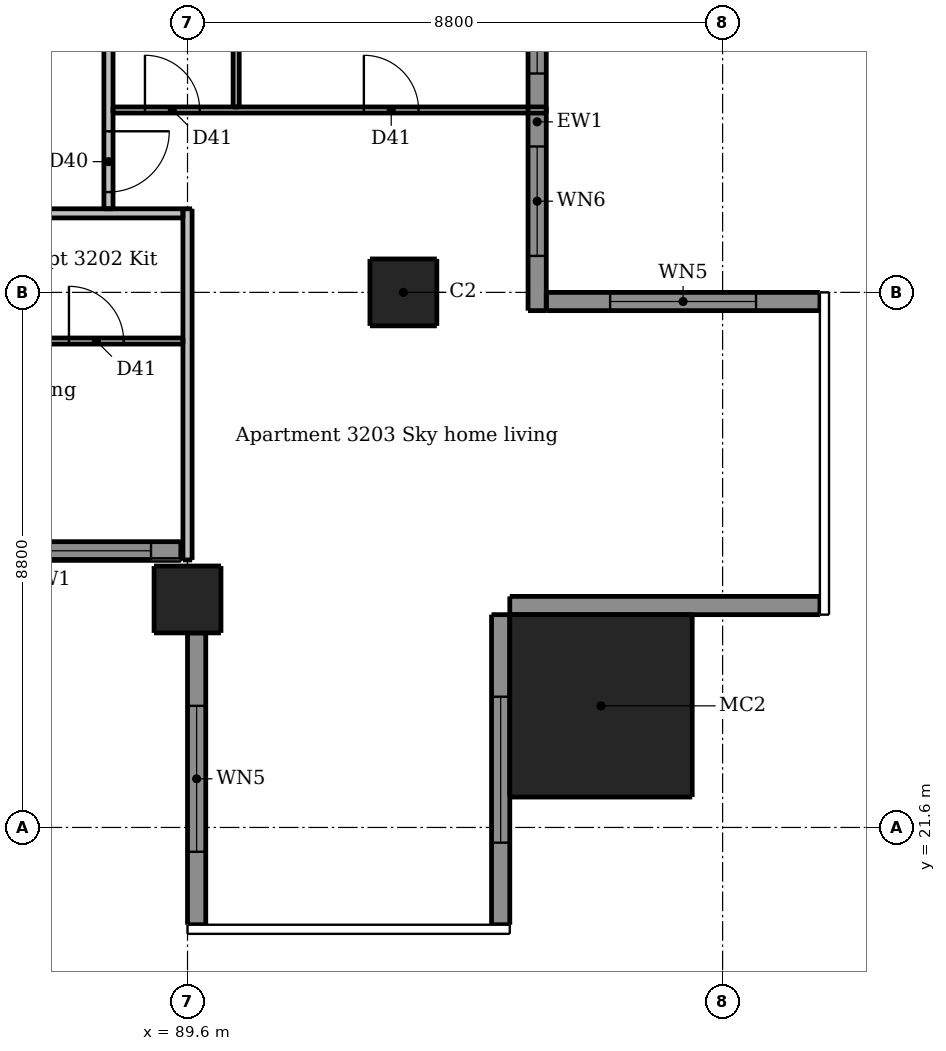
"""IFC4 building model, lengths in metres.
Left out: names, types, materials, properties, quantities, classifications, styles, units other than length and angle.
Written with IfcOpenShell. Run it as: python <this file> out.ifc"""

import sys

from ifc_helpers import new_model, si_unit, direction, frame, frame_2d, origin, origin_2d, place, context, subcontext, project, spatial, rectangle, extrude, element, fill, save


model = new_model("IFC4")
c1 = context("Model", 3, precision=1e-05, world=origin(), true_north=direction((0.0, 1.0)))
c2 = subcontext(c1, "Body", "Model", "MODEL_VIEW")
j1 = project(units=[si_unit("LENGTHUNIT", "METRE"), si_unit("PLANEANGLEUNIT", "RADIAN")], contexts=[c1])
p1 = place(None, origin())
s1 = spatial("IfcSite", under=j1, at=p1, CompositionType="ELEMENT")
p2 = place(p1, origin())
s2 = spatial("IfcBuilding", under=s1, at=p2, CompositionType="ELEMENT")
p3 = place(p2, frame((0.0, 0.0, 118.3)))
s3 = spatial("IfcBuildingStorey", under=s2, at=p3, CompositionType="ELEMENT", Elevation=118.3)
for number, where, z_axis, x_axis in (
    (1, (89.6, 25.35, 0.0), (0.0, 0.0, 1.0), (1.0, 0.0, 0.0)),
    (2, (93.15, 30.4, 0.0), (0.0, 0.0, 1.0), (1.0, 0.0, 0.0)),
):
    element("IfcColumn", number, at=place(p3, frame(where, z_axis=z_axis, x_axis=x_axis)), inside=s3, PredefinedType="COLUMN", context=c2, shape_type="SweptSolid", body=[
        extrude(rectangle(XDim=1.1, YDim=1.1, at=origin_2d()), origin(), (0.0, 0.0, 1.0), 3.05),
    ])
p4 = place(p3, frame((96.4, 23.6, 0.0), z_axis=(0.0, 0.0, 1.0), x_axis=(1.0, 0.0, 0.0)))
e3 = element("IfcColumn", 3, at=p4, inside=s3, PredefinedType="COLUMN", context=c2, shape_type="SweptSolid", body=[
    extrude(rectangle(XDim=3.0, YDim=3.0, at=origin_2d()), origin(), (0.0, 0.0, 1.0), 3.3),
])
p5 = place(p3, frame((89.75, 24.8, 0.0), z_axis=(0.0, 0.0, 1.0), x_axis=(0.0, -1.0, 0.0)))
e4 = element("IfcWall", 4, at=p5, inside=s3, PredefinedType="SOLIDWALL", context=c2, shape_type="SweptSolid", body=[
    extrude(rectangle(XDim=4.8, YDim=0.3, at=frame_2d((2.4, 0.0))), origin(), (0.0, 0.0, 1.0), 3.05),
])
p6 = place(p5, frame((1.2, 0.0, 0.15)))
e5 = element("IfcOpeningElement", 5, at=p6, cuts=e4, PredefinedType="OPENING", context=c2, shape_type="SweptSolid", body=[
    extrude(rectangle(XDim=2.4, YDim=2.1, at=frame_2d((1.2, 1.05))), frame((0.0, 0.16, 0.0), z_axis=(0.0, -1.0, 0.0), x_axis=(1.0, 0.0, 0.0)), (0.0, 0.0, 1.0), 0.32),
])
p7 = place(p3, frame((94.75, 20.0, 0.0), z_axis=(0.0, 0.0, 1.0), x_axis=(0.0, 1.0, 0.0)))
e6 = element("IfcWall", 6, at=p7, inside=s3, PredefinedType="SOLIDWALL", context=c2, shape_type="SweptSolid", body=[
    extrude(rectangle(XDim=5.1, YDim=0.3, at=frame_2d((2.55, 0.0))), origin(), (0.0, 0.0, 1.0), 3.05),
])
p8 = place(p7, frame((1.35, 0.0, 0.15)))
e7 = element("IfcOpeningElement", 7, at=p8, cuts=e6, PredefinedType="OPENING", context=c2, shape_type="SweptSolid", body=[
    extrude(rectangle(XDim=2.4, YDim=2.1, at=frame_2d((1.2, 1.05))), frame((0.0, 0.16, 0.0), z_axis=(0.0, -1.0, 0.0), x_axis=(1.0, 0.0, 0.0)), (0.0, 0.0, 1.0), 0.32),
])
p9 = place(p3, frame((94.9, 25.25, 0.0), z_axis=(0.0, 0.0, 1.0), x_axis=(1.0, 0.0, 0.0)))
e8 = element("IfcWall", 8, at=p9, inside=s3, PredefinedType="SOLIDWALL", context=c2, shape_type="SweptSolid", body=[
    extrude(rectangle(XDim=5.1, YDim=0.3, at=frame_2d((2.55, 0.0))), origin(), (0.0, 0.0, 1.0), 3.05),
])
p10 = place(p3, frame((100.0, 30.25, 0.0), z_axis=(0.0, 0.0, 1.0), x_axis=(-1.0, 0.0, 0.0)))
e9 = element("IfcWall", 9, at=p10, inside=s3, PredefinedType="SOLIDWALL", context=c2, shape_type="SweptSolid", body=[
    extrude(rectangle(XDim=4.5, YDim=0.3, at=frame_2d((2.25, 0.0))), origin(), (0.0, 0.0, 1.0), 3.05),
])
p11 = place(p10, frame((1.05, 0.0, 0.15)))
e10 = element("IfcOpeningElement", 10, at=p11, cuts=e9, PredefinedType="OPENING", context=c2, shape_type="SweptSolid", body=[
    extrude(rectangle(XDim=2.4, YDim=2.1, at=frame_2d((1.2, 1.05))), frame((0.0, 0.16, 0.0), z_axis=(0.0, -1.0, 0.0), x_axis=(1.0, 0.0, 0.0)), (0.0, 0.0, 1.0), 0.32),
])
p12 = place(p3, frame((83.7, 26.15, 0.0), z_axis=(0.0, 0.0, 1.0), x_axis=(1.0, 0.0, 0.0)))
e11 = element("IfcWall", 11, at=p12, inside=s3, PredefinedType="SOLIDWALL", context=c2, shape_type="SweptSolid", body=[
    extrude(rectangle(XDim=5.79, YDim=0.3, at=frame_2d((2.895, 0.0))), origin(), (0.0, 0.0, 1.0), 3.05),
])
p13 = place(p12, frame((0.5, 0.0, 0.15)))
e12 = element("IfcOpeningElement", 12, at=p13, cuts=e11, PredefinedType="OPENING", context=c2, shape_type="SweptSolid", body=[
    extrude(rectangle(XDim=1.8, YDim=2.1, at=frame_2d((0.9, 1.05))), frame((0.0, 0.16, 0.0), z_axis=(0.0, -1.0, 0.0), x_axis=(1.0, 0.0, 0.0)), (0.0, 0.0, 1.0), 0.32),
])
p14 = place(p12, frame((3.5, 0.0, 0.15)))
e13 = element("IfcOpeningElement", 13, at=p14, cuts=e11, PredefinedType="OPENING", context=c2, shape_type="SweptSolid", body=[
    extrude(rectangle(XDim=1.8, YDim=2.1, at=frame_2d((0.9, 1.05))), frame((0.0, 0.16, 0.0), z_axis=(0.0, -1.0, 0.0), x_axis=(1.0, 0.0, 0.0)), (0.0, 0.0, 1.0), 0.32),
])
p15 = place(p3, frame((95.35, 30.1, 0.0), z_axis=(0.0, 0.0, 1.0), x_axis=(0.0, 1.0, 0.0)))
e14 = element("IfcWall", 14, at=p15, inside=s3, PredefinedType="SOLIDWALL", context=c2, shape_type="SweptSolid", body=[
    extrude(rectangle(XDim=6.21, YDim=0.3, at=frame_2d((3.105, 0.0))), origin(), (0.0, 0.0, 1.0), 3.05),
])
p16 = place(p15, frame((0.9, 0.0, 0.15)))
e15 = element("IfcOpeningElement", 15, at=p16, cuts=e14, PredefinedType="OPENING", context=c2, shape_type="SweptSolid", body=[
    extrude(rectangle(XDim=1.8, YDim=2.1, at=frame_2d((0.9, 1.05))), frame((0.0, 0.16, 0.0), z_axis=(0.0, -1.0, 0.0), x_axis=(1.0, 0.0, 0.0)), (0.0, 0.0, 1.0), 0.32),
])
p17 = place(p15, frame((3.9, 0.0, 0.15)))
e16 = element("IfcOpeningElement", 16, at=p17, cuts=e14, PredefinedType="OPENING", context=c2, shape_type="SweptSolid", body=[
    extrude(rectangle(XDim=1.8, YDim=2.1, at=frame_2d((0.9, 1.05))), frame((0.0, 0.16, 0.0), z_axis=(0.0, -1.0, 0.0), x_axis=(1.0, 0.0, 0.0)), (0.0, 0.0, 1.0), 0.32),
])
p18 = place(p3, frame((90.4, 33.45, 0.0), z_axis=(0.0, 0.0, 1.0), x_axis=(0.0, 1.0, 0.0)))
e17 = element("IfcWall", 17, at=p18, inside=s3, PredefinedType="PARTITIONING", context=c2, shape_type="SweptSolid", body=[
    extrude(rectangle(XDim=5.875, YDim=0.1, at=frame_2d((2.938, 0.0))), origin(), (0.0, 0.0, 1.0), 3.05),
])
p19 = place(p18, frame((3.75, 0.0, 0.0)))
e18 = element("IfcOpeningElement", 18, at=p19, cuts=e17, PredefinedType="OPENING", context=c2, shape_type="SweptSolid", body=[
    extrude(rectangle(XDim=0.8, YDim=2.1, at=frame_2d((0.4, 1.05))), frame((0.0, 0.06, 0.0), z_axis=(0.0, -1.0, 0.0), x_axis=(1.0, 0.0, 0.0)), (0.0, 0.0, 1.0), 0.12),
])
p20 = place(p3, frame((88.375, 33.4, 0.0), z_axis=(0.0, 0.0, 1.0), x_axis=(1.0, 0.0, 0.0)))
e19 = element("IfcWall", 19, at=p20, inside=s3, PredefinedType="PARTITIONING", context=c2, shape_type="SweptSolid", body=[
    extrude(rectangle(XDim=7.125, YDim=0.1, at=frame_2d((3.562, 0.0))), origin(), (0.0, 0.0, 1.0), 3.05),
])
p21 = place(p20, frame((0.525, 0.0, 0.0)))
e20 = element("IfcOpeningElement", 20, at=p21, cuts=e19, PredefinedType="OPENING", context=c2, shape_type="SweptSolid", body=[
    extrude(rectangle(XDim=0.9, YDim=2.1, at=frame_2d((0.45, 1.05))), frame((0.0, 0.06, 0.0), z_axis=(0.0, -1.0, 0.0), x_axis=(1.0, 0.0, 0.0)), (0.0, 0.0, 1.0), 0.12),
])
p22 = place(p20, frame((4.125, 0.0, 0.0)))
e21 = element("IfcOpeningElement", 21, at=p22, cuts=e19, PredefinedType="OPENING", context=c2, shape_type="SweptSolid", body=[
    extrude(rectangle(XDim=0.9, YDim=2.1, at=frame_2d((0.45, 1.05))), frame((0.0, 0.06, 0.0), z_axis=(0.0, -1.0, 0.0), x_axis=(1.0, 0.0, 0.0)), (0.0, 0.0, 1.0), 0.12),
])
p23 = place(p3, frame((86.65, 29.6, 0.0), z_axis=(0.0, 0.0, 1.0), x_axis=(1.0, 0.0, 0.0)))
e22 = element("IfcWall", 22, at=p23, inside=s3, PredefinedType="PARTITIONING", context=c2, shape_type="SweptSolid", body=[
    extrude(rectangle(XDim=2.875, YDim=0.1, at=frame_2d((1.438, 0.0))), origin(), (0.0, 0.0, 1.0), 3.05),
])
p24 = place(p23, frame((1.0, 0.0, 0.0)))
e23 = element("IfcOpeningElement", 23, at=p24, cuts=e22, PredefinedType="OPENING", context=c2, shape_type="SweptSolid", body=[
    extrude(rectangle(XDim=0.9, YDim=2.1, at=frame_2d((0.45, 1.05))), frame((0.0, 0.06, 0.0), z_axis=(0.0, -1.0, 0.0), x_axis=(1.0, 0.0, 0.0)), (0.0, 0.0, 1.0), 0.12),
])
p25 = place(p3, frame((88.3, 60.475, 0.0), z_axis=(0.0, 0.0, 1.0), x_axis=(0.0, -1.0, 0.0)))
e24 = element("IfcWall", 24, at=p25, inside=s3, PredefinedType="PARTITIONING", context=c2, shape_type="SweptSolid", body=[
    extrude(rectangle(XDim=28.7, YDim=0.15, at=frame_2d((14.35, 0.0))), origin(), (0.0, 0.0, 1.0), 3.05),
])
p26 = place(p25, frame((27.425, 0.0, 0.0)))
e25 = element("IfcOpeningElement", 25, at=p26, cuts=e24, PredefinedType="OPENING", context=c2, shape_type="SweptSolid", body=[
    extrude(rectangle(XDim=1.0, YDim=2.1, at=frame_2d((0.5, 1.05))), frame((0.0, 0.085, 0.0), z_axis=(0.0, -1.0, 0.0), x_axis=(1.0, 0.0, 0.0)), (0.0, 0.0, 1.0), 0.17),
])
p27 = place(p25, frame((13.075, 0.0, 0.0)))
e26 = element("IfcOpeningElement", 26, at=p27, cuts=e24, PredefinedType="OPENING", context=c2, shape_type="SweptSolid", body=[
    extrude(rectangle(XDim=1.0, YDim=2.1, at=frame_2d((0.5, 1.05))), frame((0.0, 0.085, 0.0), z_axis=(0.0, -1.0, 0.0), x_axis=(1.0, 0.0, 0.0)), (0.0, 0.0, 1.0), 0.17),
])
p28 = place(p25, frame((2.575, 0.0, 0.0)))
e27 = element("IfcOpeningElement", 27, at=p28, cuts=e24, PredefinedType="OPENING", context=c2, shape_type="SweptSolid", body=[
    extrude(rectangle(XDim=1.0, YDim=2.1, at=frame_2d((0.5, 1.05))), frame((0.0, 0.085, 0.0), z_axis=(0.0, -1.0, 0.0), x_axis=(1.0, 0.0, 0.0)), (0.0, 0.0, 1.0), 0.17),
])
p29 = place(p3, frame((89.6, 26.0, 0.0), z_axis=(0.0, 0.0, 1.0), x_axis=(0.0, 1.0, 0.0)))
e28 = element("IfcWall", 28, at=p29, inside=s3, PredefinedType="PARTITIONING", context=c2, shape_type="SweptSolid", body=[
    extrude(rectangle(XDim=5.775, YDim=0.15, at=frame_2d((2.887, 0.0))), origin(), (0.0, 0.0, 1.0), 2.516),
])
p30 = place(p3, frame((89.525, 31.7, 0.0), z_axis=(0.0, 0.0, 1.0), x_axis=(-1.0, 0.0, 0.0)))
e29 = element("IfcWall", 29, at=p30, inside=s3, PredefinedType="PARTITIONING", context=c2, shape_type="SweptSolid", body=[
    extrude(rectangle(XDim=28.75, YDim=0.15, at=frame_2d((14.375, 0.0))), origin(), (0.0, 0.0, 1.0), 3.05),
])
p31 = place(p30, frame((24.625, 0.0, 0.0)))
e30 = element("IfcOpeningElement", 30, at=p31, cuts=e29, PredefinedType="OPENING", context=c2, shape_type="SweptSolid", body=[
    extrude(rectangle(XDim=1.0, YDim=2.1, at=frame_2d((0.5, 1.05))), frame((0.0, 0.085, 0.0), z_axis=(0.0, -1.0, 0.0), x_axis=(1.0, 0.0, 0.0)), (0.0, 0.0, 1.0), 0.17),
])
p32 = place(p30, frame((5.425, 0.0, 0.0)))
e31 = element("IfcOpeningElement", 31, at=p32, cuts=e29, PredefinedType="OPENING", context=c2, shape_type="SweptSolid", body=[
    extrude(rectangle(XDim=1.0, YDim=2.1, at=frame_2d((0.5, 1.05))), frame((0.0, 0.085, 0.0), z_axis=(0.0, -1.0, 0.0), x_axis=(1.0, 0.0, 0.0)), (0.0, 0.0, 1.0), 0.17),
])
p33 = place(p6, origin())
e32 = element("IfcWindow", 32, at=p33, inside=s3, PartitioningType="DOUBLE_PANEL_VERTICAL", PredefinedType="WINDOW", context=c2, shape_type="SweptSolid", body=[
    extrude(rectangle(XDim=2.4, YDim=2.1, at=frame_2d((1.2, 1.05))), frame((0.0, 0.03, 0.0), z_axis=(0.0, -1.0, 0.0), x_axis=(1.0, 0.0, 0.0)), (0.0, 0.0, 1.0), 0.06),
])
fill(e5, e32)
p34 = place(p8, origin())
e33 = element("IfcWindow", 33, at=p34, inside=s3, PartitioningType="DOUBLE_PANEL_VERTICAL", PredefinedType="WINDOW", context=c2, shape_type="SweptSolid", body=[
    extrude(rectangle(XDim=2.4, YDim=2.1, at=frame_2d((1.2, 1.05))), frame((0.0, 0.03, 0.0), z_axis=(0.0, -1.0, 0.0), x_axis=(1.0, 0.0, 0.0)), (0.0, 0.0, 1.0), 0.06),
])
fill(e7, e33)
p35 = place(p11, origin())
e34 = element("IfcWindow", 34, at=p35, inside=s3, PartitioningType="DOUBLE_PANEL_VERTICAL", PredefinedType="WINDOW", context=c2, shape_type="SweptSolid", body=[
    extrude(rectangle(XDim=2.4, YDim=2.1, at=frame_2d((1.2, 1.05))), frame((0.0, 0.03, 0.0), z_axis=(0.0, -1.0, 0.0), x_axis=(1.0, 0.0, 0.0)), (0.0, 0.0, 1.0), 0.06),
])
fill(e10, e34)
p36 = place(p14, origin())
e35 = element("IfcWindow", 35, at=p36, inside=s3, PartitioningType="DOUBLE_PANEL_VERTICAL", PredefinedType="WINDOW", context=c2, shape_type="SweptSolid", body=[
    extrude(rectangle(XDim=1.8, YDim=2.1, at=frame_2d((0.9, 1.05))), frame((0.0, 0.03, 0.0), z_axis=(0.0, -1.0, 0.0), x_axis=(1.0, 0.0, 0.0)), (0.0, 0.0, 1.0), 0.06),
])
fill(e13, e35)
p37 = place(p16, origin())
e36 = element("IfcWindow", 36, at=p37, inside=s3, PartitioningType="DOUBLE_PANEL_VERTICAL", PredefinedType="WINDOW", context=c2, shape_type="SweptSolid", body=[
    extrude(rectangle(XDim=1.8, YDim=2.1, at=frame_2d((0.9, 1.05))), frame((0.0, 0.03, 0.0), z_axis=(0.0, -1.0, 0.0), x_axis=(1.0, 0.0, 0.0)), (0.0, 0.0, 1.0), 0.06),
])
fill(e15, e36)
p38 = place(p17, origin())
e37 = element("IfcWindow", 37, at=p38, inside=s3, PartitioningType="DOUBLE_PANEL_VERTICAL", PredefinedType="WINDOW", context=c2, shape_type="SweptSolid", body=[
    extrude(rectangle(XDim=1.8, YDim=2.1, at=frame_2d((0.9, 1.05))), frame((0.0, 0.03, 0.0), z_axis=(0.0, -1.0, 0.0), x_axis=(1.0, 0.0, 0.0)), (0.0, 0.0, 1.0), 0.06),
])
fill(e16, e37)
p39 = place(p24, origin())
e38 = element("IfcDoor", 38, at=p39, inside=s3, OperationType="SINGLE_SWING_LEFT", PredefinedType="DOOR", context=c2, shape_type="SweptSolid", body=[
    extrude(rectangle(XDim=0.9, YDim=2.1, at=frame_2d((0.45, 1.05))), frame((0.0, 0.025, 0.0), z_axis=(0.0, -1.0, 0.0), x_axis=(1.0, 0.0, 0.0)), (0.0, 0.0, 1.0), 0.05),
])
fill(e23, e38)
p40 = place(p26, origin())
e39 = element("IfcDoor", 39, at=p40, inside=s3, OperationType="SINGLE_SWING_LEFT", PredefinedType="DOOR", context=c2, shape_type="SweptSolid", body=[
    extrude(rectangle(XDim=1.0, YDim=2.1, at=frame_2d((0.5, 1.05))), frame((0.0, 0.025, 0.0), z_axis=(0.0, -1.0, 0.0), x_axis=(1.0, 0.0, 0.0)), (0.0, 0.0, 1.0), 0.05),
])
fill(e25, e39)
p41 = place(p21, origin())
e40 = element("IfcDoor", 40, at=p41, inside=s3, OperationType="SINGLE_SWING_LEFT", PredefinedType="DOOR", context=c2, shape_type="SweptSolid", body=[
    extrude(rectangle(XDim=0.9, YDim=2.1, at=frame_2d((0.45, 1.05))), frame((0.0, 0.025, 0.0), z_axis=(0.0, -1.0, 0.0), x_axis=(1.0, 0.0, 0.0)), (0.0, 0.0, 1.0), 0.05),
])
fill(e20, e40)
p42 = place(p22, origin())
e41 = element("IfcDoor", 41, at=p42, inside=s3, OperationType="SINGLE_SWING_LEFT", PredefinedType="DOOR", context=c2, shape_type="SweptSolid", body=[
    extrude(rectangle(XDim=0.9, YDim=2.1, at=frame_2d((0.45, 1.05))), frame((0.0, 0.025, 0.0), z_axis=(0.0, -1.0, 0.0), x_axis=(1.0, 0.0, 0.0)), (0.0, 0.0, 1.0), 0.05),
])
fill(e21, e41)
save(model, sys.argv[1])
